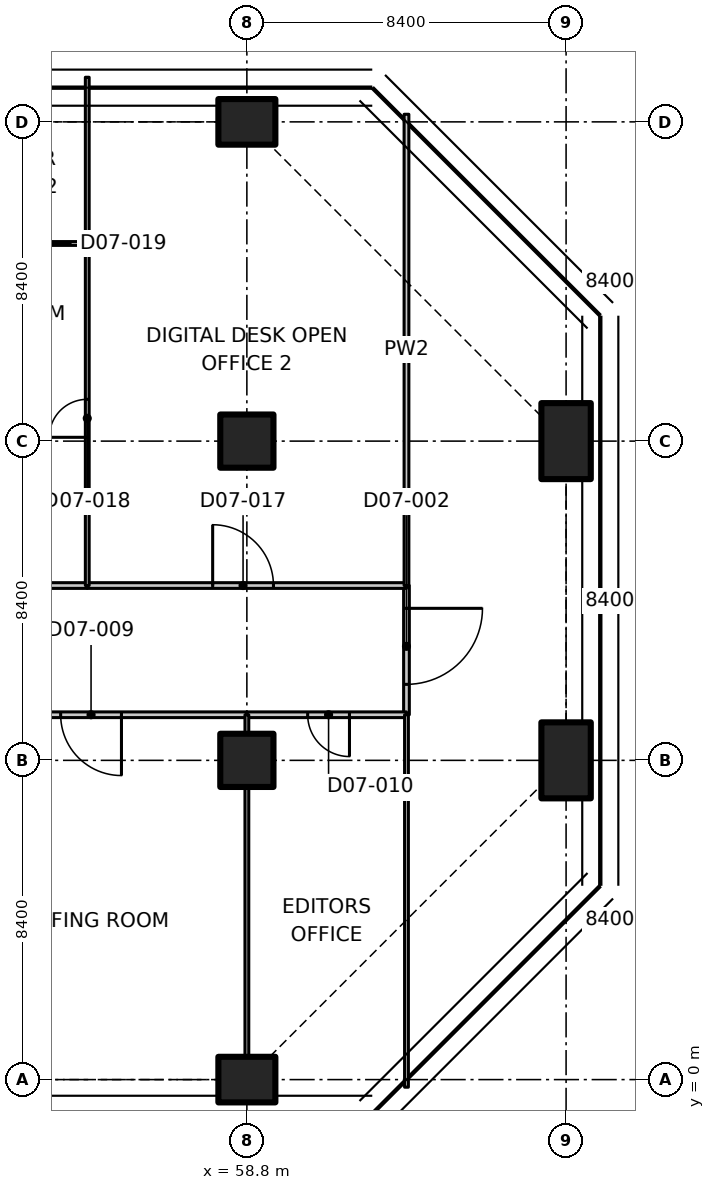
"""IFC4 building model, lengths in metres.
Left out: names, types, materials, properties, quantities, classifications, styles, units other than length and angle.
Written with IfcOpenShell. Run it as: python <this file> out.ifc"""

import sys

from ifc_helpers import new_model, si_unit, direction, frame, frame_2d, origin, origin_2d, place, context, subcontext, project, spatial, polyline, rectangle, outline, extrude, element, fill, save


model = new_model("IFC4")
c1 = context("Model", 3, precision=1e-05, world=origin(), true_north=direction((0.0, 1.0)))
c2 = subcontext(c1, "Body", "Model", "MODEL_VIEW")
j1 = project(units=[si_unit("LENGTHUNIT", "METRE"), si_unit("PLANEANGLEUNIT", "RADIAN")], contexts=[c1])
p1 = place(None, origin())
s1 = spatial("IfcSite", under=j1, at=p1, CompositionType="ELEMENT")
p2 = place(p1, origin())
s2 = spatial("IfcBuilding", under=s1, at=p2, CompositionType="ELEMENT")
p3 = place(p2, frame((0.0, 0.0, 43.7)))
s3 = spatial("IfcBuildingStorey", under=s2, at=p3, CompositionType="ELEMENT", Elevation=43.7)
p4 = place(p3, frame((58.8, 0.0, 0.0), z_axis=(0.0, 0.0, 1.0), x_axis=(0.0, 1.0, 0.0)))
e1 = element("IfcColumn", 1, at=p4, inside=s3, PredefinedType="COLUMN", context=c2, shape_type="SweptSolid", body=[
    extrude(rectangle(XDim=1.2, YDim=1.5, at=origin_2d()), origin(), (0.0, 0.0, 1.0), 3.35),
])
for number, where, z_axis, x_axis in (
    (2, (58.8, 8.4, 0.0), (0.0, 0.0, 1.0), (1.0, 0.0, 0.0)),
    (3, (58.8, 16.8, 0.0), (0.0, 0.0, 1.0), (1.0, 0.0, 0.0)),
):
    element("IfcColumn", number, at=place(p3, frame(where, z_axis=z_axis, x_axis=x_axis)), inside=s3, PredefinedType="COLUMN", context=c2, shape_type="SweptSolid", body=[
        extrude(rectangle(XDim=1.4, YDim=1.4, at=origin_2d()), origin(), (0.0, 0.0, 1.0), 3.35),
    ])
p5 = place(p3, frame((58.8, 25.2, 0.0), z_axis=(0.0, 0.0, 1.0), x_axis=(0.0, 1.0, 0.0)))
e4 = element("IfcColumn", 4, at=p5, inside=s3, PredefinedType="COLUMN", context=c2, shape_type="SweptSolid", body=[
    extrude(rectangle(XDim=1.2, YDim=1.5, at=origin_2d()), origin(), (0.0, 0.0, 1.0), 3.35),
])
for number, where, z_axis, x_axis in (
    (5, (67.2, 8.4, 0.0), (0.0, 0.0, 1.0), (1.0, 0.0, 0.0)),
    (6, (67.2, 16.8, 0.0), (0.0, 0.0, 1.0), (1.0, 0.0, 0.0)),
):
    element("IfcColumn", number, at=place(p3, frame(where, z_axis=z_axis, x_axis=x_axis)), inside=s3, PredefinedType="COLUMN", context=c2, shape_type="SweptSolid", body=[
        extrude(rectangle(XDim=1.3, YDim=2.0, at=origin_2d()), origin(), (0.0, 0.0, 1.0), 3.35),
    ])
p6 = place(p3, frame((63.0, 13.0, 0.0), z_axis=(0.0, 0.0, 1.0), x_axis=(0.0, -1.0, 0.0)))
e7 = element("IfcWall", 7, at=p6, inside=s3, PredefinedType="PARTITIONING", context=c2, shape_type="SweptSolid", body=[
    extrude(rectangle(XDim=3.4, YDim=0.15, at=frame_2d((1.7, 0.0))), origin(), (0.0, 0.0, 1.0), 3.33),
])
p7 = place(p6, frame((0.6, 0.0, 0.0)))
e8 = element("IfcOpeningElement", 8, at=p7, cuts=e7, PredefinedType="OPENING", context=c2, shape_type="SweptSolid", body=[
    extrude(rectangle(XDim=2.0, YDim=2.4, at=frame_2d((1.0, 1.2))), frame((0.0, 0.085, 0.0), z_axis=(0.0, -1.0, 0.0), x_axis=(1.0, 0.0, 0.0)), (0.0, 0.0, 1.0), 0.17),
])
p8 = place(p3, frame((58.8, 9.6, 0.0), z_axis=(0.0, 0.0, 1.0), x_axis=(-1.0, 0.0, 0.0)))
e9 = element("IfcWall", 9, at=p8, inside=s3, PredefinedType="PARTITIONING", context=c2, shape_type="SweptSolid", body=[
    extrude(rectangle(XDim=8.4, YDim=0.15, at=frame_2d((4.2, 0.0))), origin(), (0.0, 0.0, 1.0), 3.33),
])
p9 = place(p8, frame((3.3, 0.0, 0.0)))
e10 = element("IfcOpeningElement", 10, at=p9, cuts=e9, PredefinedType="OPENING", context=c2, shape_type="SweptSolid", body=[
    extrude(rectangle(XDim=1.6, YDim=2.1, at=frame_2d((0.8, 1.05))), frame((0.0, 0.085, 0.0), z_axis=(0.0, -1.0, 0.0), x_axis=(1.0, 0.0, 0.0)), (0.0, 0.0, 1.0), 0.17),
])
p10 = place(p3, frame((63.0, 9.6, 0.0), z_axis=(0.0, 0.0, 1.0), x_axis=(-1.0, 0.0, 0.0)))
e11 = element("IfcWall", 11, at=p10, inside=s3, PredefinedType="PARTITIONING", context=c2, shape_type="SweptSolid", body=[
    extrude(rectangle(XDim=4.2, YDim=0.15, at=frame_2d((2.1, 0.0))), origin(), (0.0, 0.0, 1.0), 3.33),
])
p11 = place(p10, frame((1.5, 0.0, 0.0)))
e12 = element("IfcOpeningElement", 12, at=p11, cuts=e11, PredefinedType="OPENING", context=c2, shape_type="SweptSolid", body=[
    extrude(rectangle(XDim=1.1, YDim=2.1, at=frame_2d((0.55, 1.05))), frame((0.0, 0.085, 0.0), z_axis=(0.0, -1.0, 0.0), x_axis=(1.0, 0.0, 0.0)), (0.0, 0.0, 1.0), 0.17),
])
p12 = place(p3, frame((54.6, 13.0, 0.0), z_axis=(0.0, 0.0, 1.0), x_axis=(1.0, 0.0, 0.0)))
e13 = element("IfcWall", 13, at=p12, inside=s3, PredefinedType="PARTITIONING", context=c2, shape_type="SweptSolid", body=[
    extrude(rectangle(XDim=8.4, YDim=0.15, at=frame_2d((4.2, 0.0))), origin(), (0.0, 0.0, 1.0), 3.33),
])
p13 = place(p12, frame((3.3, 0.0, 0.0)))
e14 = element("IfcOpeningElement", 14, at=p13, cuts=e13, PredefinedType="OPENING", context=c2, shape_type="SweptSolid", body=[
    extrude(rectangle(XDim=1.6, YDim=2.1, at=frame_2d((0.8, 1.05))), frame((0.0, 0.085, 0.0), z_axis=(0.0, -1.0, 0.0), x_axis=(1.0, 0.0, 0.0)), (0.0, 0.0, 1.0), 0.17),
])
p14 = place(p3, frame((50.4, 13.0, 0.0), z_axis=(0.0, 0.0, 1.0), x_axis=(1.0, 0.0, 0.0)))
e15 = element("IfcWall", 15, at=p14, inside=s3, PredefinedType="PARTITIONING", context=c2, shape_type="SweptSolid", body=[
    extrude(rectangle(XDim=4.2, YDim=0.15, at=frame_2d((2.1, 0.0))), origin(), (0.0, 0.0, 1.0), 3.33),
])
p15 = place(p3, frame((63.0, -0.2, 0.0), z_axis=(0.0, 0.0, 1.0), x_axis=(0.0, 1.0, 0.0)))
e16 = element("IfcWall", 16, at=p15, inside=s3, PredefinedType="PARTITIONING", context=c2, shape_type="SweptSolid", body=[
    extrude(outline(polyline([(0.0, 0.0), (9.8, 0.0), (9.8, 3.33), (5.066, 3.33), (5.064, 2.98), (3.736, 2.98), (3.734, 3.33), (0.0, 3.33), (0.0, 0.0)])), frame((0.0, 0.05, 0.0), z_axis=(0.0, -1.0, 0.0), x_axis=(1.0, 0.0, 0.0)), (0.0, 0.0, 1.0), 0.1),
])
p16 = place(p3, frame((63.0, 13.0, 0.0), z_axis=(0.0, 0.0, 1.0), x_axis=(0.0, 1.0, 0.0)))
e17 = element("IfcWall", 17, at=p16, inside=s3, PredefinedType="PARTITIONING", context=c2, shape_type="SweptSolid", body=[
    extrude(outline(polyline([(0.0, 0.0), (12.4, 0.0), (12.4, 3.33), (8.678, 3.33), (8.676, 2.98), (7.324, 2.98), (7.322, 3.33), (0.0, 3.33), (0.0, 0.0)])), frame((0.0, 0.062, 0.0), z_axis=(0.0, -1.0, 0.0), x_axis=(1.0, 0.0, 0.0)), (0.0, 0.0, 1.0), 0.125),
])
p17 = place(p3, frame((58.8, 9.6, 0.0), z_axis=(0.0, 0.0, 1.0), x_axis=(0.0, -1.0, 0.0)))
e18 = element("IfcWall", 18, at=p17, inside=s3, PredefinedType="PARTITIONING", context=c2, shape_type="SweptSolid", body=[
    extrude(rectangle(XDim=0.48, YDim=0.1, at=frame_2d((0.24, 0.0))), origin(), (0.0, 0.0, 1.0), 3.33),
])
p18 = place(p3, frame((58.8, 7.68, 0.0), z_axis=(0.0, 0.0, 1.0), x_axis=(0.0, -1.0, 0.0)))
e19 = element("IfcWall", 19, at=p18, inside=s3, PredefinedType="PARTITIONING", context=c2, shape_type="SweptSolid", body=[
    extrude(rectangle(XDim=7.06, YDim=0.1, at=frame_2d((3.53, 0.0))), origin(), (0.0, 0.0, 1.0), 3.33),
])
p19 = place(p3, frame((54.6, 13.0, 0.0), z_axis=(0.0, 0.0, 1.0), x_axis=(0.0, 1.0, 0.0)))
e20 = element("IfcWall", 20, at=p19, inside=s3, PredefinedType="PARTITIONING", context=c2, shape_type="SweptSolid", body=[
    extrude(rectangle(XDim=9.0, YDim=0.1, at=frame_2d((4.5, 0.0))), origin(), (0.0, 0.0, 1.0), 3.33),
])
p20 = place(p19, frame((3.9, 0.0, 0.0)))
e21 = element("IfcOpeningElement", 21, at=p20, cuts=e20, PredefinedType="OPENING", context=c2, shape_type="SweptSolid", body=[
    extrude(rectangle(XDim=1.0, YDim=2.1, at=frame_2d((0.5, 1.05))), frame((0.0, 0.06, 0.0), z_axis=(0.0, -1.0, 0.0), x_axis=(1.0, 0.0, 0.0)), (0.0, 0.0, 1.0), 0.12),
])
p21 = place(p3, frame((54.6, 22.0, 0.0), z_axis=(0.0, 0.0, 1.0), x_axis=(0.0, 1.0, 0.0)))
e22 = element("IfcWall", 22, at=p21, inside=s3, PredefinedType="PARTITIONING", context=c2, shape_type="SweptSolid", body=[
    extrude(rectangle(XDim=4.374, YDim=0.1, at=frame_2d((2.187, 0.0))), origin(), (0.0, 0.0, 1.0), 2.98),
])
p22 = place(p3, frame((50.4, 22.0, 0.0), z_axis=(0.0, 0.0, 1.0), x_axis=(1.0, 0.0, 0.0)))
e23 = element("IfcWall", 23, at=p22, inside=s3, PredefinedType="PARTITIONING", context=c2, shape_type="SweptSolid", body=[
    extrude(rectangle(XDim=4.2, YDim=0.1, at=frame_2d((2.1, 0.0))), origin(), (0.0, 0.0, 1.0), 3.33),
])
p23 = place(p22, frame((1.8, 0.0, 0.0)))
e24 = element("IfcOpeningElement", 24, at=p23, cuts=e23, PredefinedType="OPENING", context=c2, shape_type="SweptSolid", body=[
    extrude(rectangle(XDim=0.9, YDim=2.1, at=frame_2d((0.45, 1.05))), frame((0.0, 0.06, 0.0), z_axis=(0.0, -1.0, 0.0), x_axis=(1.0, 0.0, 0.0)), (0.0, 0.0, 1.0), 0.12),
])
p24 = place(p7, origin())
e25 = element("IfcDoor", 25, at=p24, inside=s3, OperationType="DOUBLE_DOOR_SINGLE_SWING", PredefinedType="DOOR", context=c2, shape_type="SweptSolid", body=[
    extrude(rectangle(XDim=2.0, YDim=2.4, at=frame_2d((1.0, 1.2))), frame((0.0, 0.025, 0.0), z_axis=(0.0, -1.0, 0.0), x_axis=(1.0, 0.0, 0.0)), (0.0, 0.0, 1.0), 0.05),
])
fill(e8, e25)
p25 = place(p9, origin())
e26 = element("IfcDoor", 26, at=p25, inside=s3, OperationType="DOUBLE_DOOR_SINGLE_SWING", PredefinedType="DOOR", context=c2, shape_type="SweptSolid", body=[
    extrude(rectangle(XDim=1.6, YDim=2.1, at=frame_2d((0.8, 1.05))), frame((0.0, 0.025, 0.0), z_axis=(0.0, -1.0, 0.0), x_axis=(1.0, 0.0, 0.0)), (0.0, 0.0, 1.0), 0.05),
])
fill(e10, e26)
p26 = place(p11, origin())
e27 = element("IfcDoor", 27, at=p26, inside=s3, OperationType="SINGLE_SWING_LEFT", PredefinedType="DOOR", context=c2, shape_type="SweptSolid", body=[
    extrude(rectangle(XDim=1.1, YDim=2.1, at=frame_2d((0.55, 1.05))), frame((0.0, 0.025, 0.0), z_axis=(0.0, -1.0, 0.0), x_axis=(1.0, 0.0, 0.0)), (0.0, 0.0, 1.0), 0.05),
])
fill(e12, e27)
p27 = place(p13, origin())
e28 = element("IfcDoor", 28, at=p27, inside=s3, OperationType="DOUBLE_DOOR_SINGLE_SWING", PredefinedType="DOOR", context=c2, shape_type="SweptSolid", body=[
    extrude(rectangle(XDim=1.6, YDim=2.1, at=frame_2d((0.8, 1.05))), frame((0.0, 0.025, 0.0), z_axis=(0.0, -1.0, 0.0), x_axis=(1.0, 0.0, 0.0)), (0.0, 0.0, 1.0), 0.05),
])
fill(e14, e28)
p28 = place(p20, origin())
e29 = element("IfcDoor", 29, at=p28, inside=s3, OperationType="SINGLE_SWING_LEFT", PredefinedType="DOOR", context=c2, shape_type="SweptSolid", body=[
    extrude(rectangle(XDim=1.0, YDim=2.1, at=frame_2d((0.5, 1.05))), frame((0.0, 0.025, 0.0), z_axis=(0.0, -1.0, 0.0), x_axis=(1.0, 0.0, 0.0)), (0.0, 0.0, 1.0), 0.05),
])
fill(e21, e29)
save(model, sys.argv[1])
